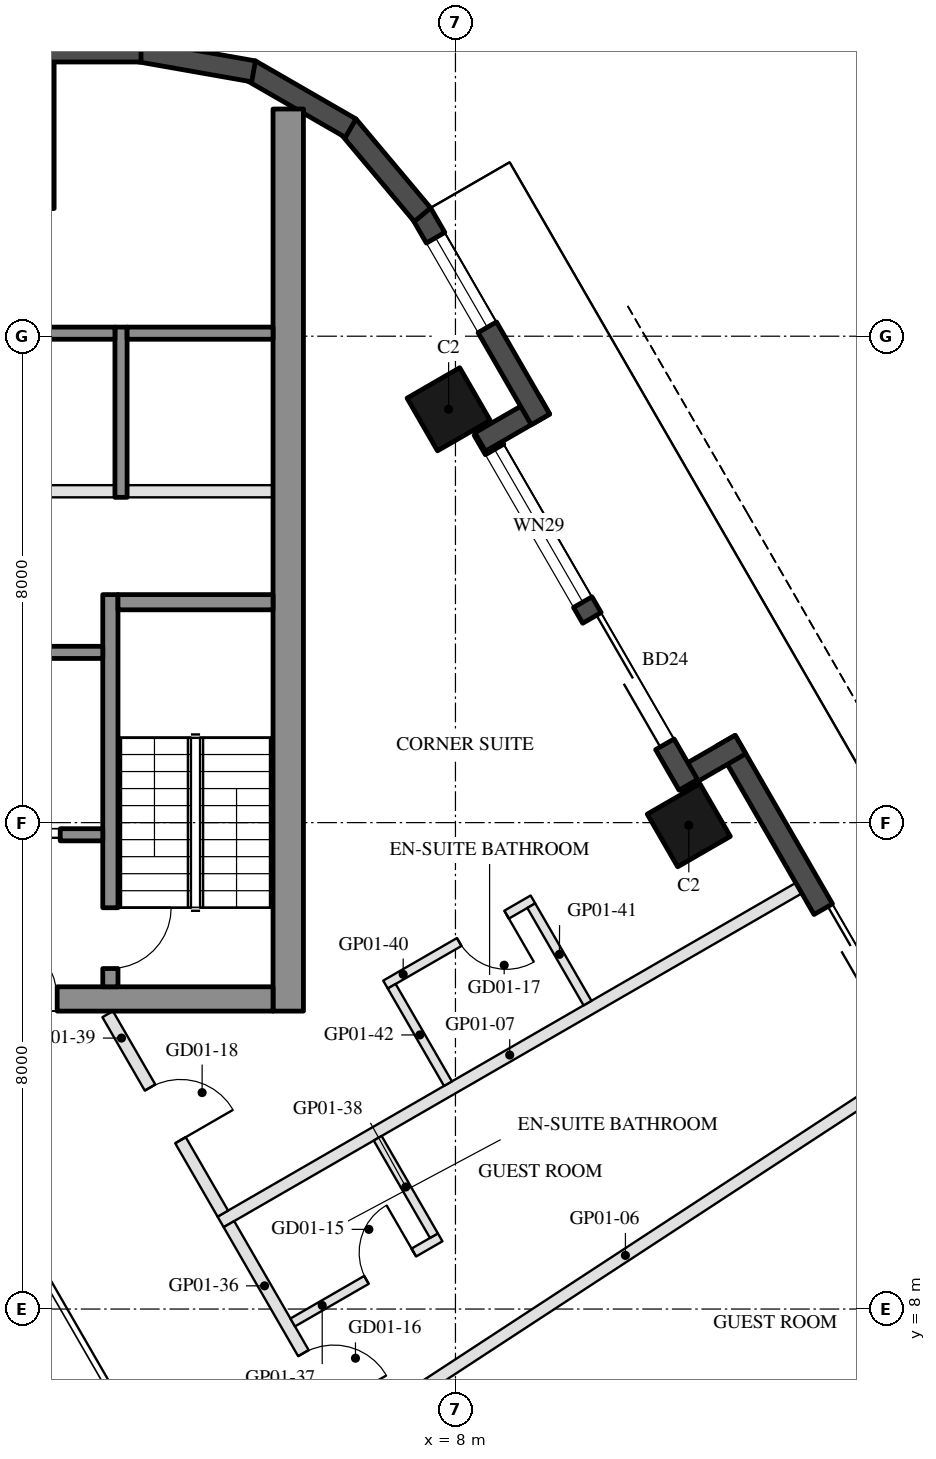
"""IFC4 building model, lengths in metres.
Left out: names, types, materials, properties, quantities, classifications, styles, units other than length and angle.
Written with IfcOpenShell. Run it as: python <this file> out.ifc"""

import sys

from ifc_helpers import new_model, si_unit, direction, frame, frame_2d, origin, origin_2d, place, context, subcontext, project, spatial, rectangle, hollow_rectangle, extrude, element, fill, save


model = new_model("IFC4")
c1 = context("Model", 3, precision=1e-05, world=origin(), true_north=direction((0.0, 1.0)))
c2 = subcontext(c1, "Body", "Model", "MODEL_VIEW")
j1 = project(units=[si_unit("LENGTHUNIT", "METRE"), si_unit("PLANEANGLEUNIT", "RADIAN")], contexts=[c1])
p1 = place(None, origin())
s1 = spatial("IfcSite", under=j1, at=p1, CompositionType="ELEMENT")
p2 = place(p1, origin())
s2 = spatial("IfcBuilding", under=s1, at=p2, CompositionType="ELEMENT")
p3 = place(p2, frame((0.0, 0.0, 50.2)))
s3 = spatial("IfcBuildingStorey", under=s2, at=p3, CompositionType="ELEMENT", Elevation=50.2)
for number, where, z_axis, x_axis in (
    (1, (11.838, 15.957, 0.0), (0.0, 0.0, 1.0), (-0.5, 0.866, 0.0)),
    (2, (7.888, 22.798, 0.0), (0.0, 0.0, 1.0), (-0.5, 0.866, 0.0)),
):
    element("IfcColumn", number, at=place(p3, frame(where, z_axis=z_axis, x_axis=x_axis)), inside=s3, PredefinedType="COLUMN", context=c2, shape_type="SweptSolid", body=[
        extrude(hollow_rectangle(XDim=1.0, YDim=1.0, WallThickness=0.045, at=origin_2d()), origin(), (0.0, 0.0, 1.0), 3.7),
    ])
p4 = place(p3, frame((0.0, 27.3, 0.0), z_axis=(0.0, 0.0, 1.0), x_axis=(1.0, 0.0, 0.0)))
e3 = element("IfcColumn", 3, at=p4, inside=s3, PredefinedType="COLUMN", context=c2, shape_type="SweptSolid", body=[
    extrude(hollow_rectangle(XDim=2.8, YDim=2.4, WallThickness=0.07, at=origin_2d()), origin(), (0.0, 0.0, 1.0), 3.7),
])
p5 = place(p3, frame((17.299, 8.948, 0.0), z_axis=(0.0, 0.0, 1.0), x_axis=(-0.500010041276, 0.866019606374, 0.0)))
e4 = element("IfcWall", 4, at=p5, inside=s3, PredefinedType="SOLIDWALL", context=c2, shape_type="SweptSolid", body=[
    extrude(rectangle(XDim=9.7, YDim=0.35, at=frame_2d((4.85, 0.0))), origin(), (0.0, 0.0, 1.0), 3.55),
])
p6 = place(p5, frame((1.8, 0.0, 0.0)))
e5 = element("IfcOpeningElement", 5, at=p6, cuts=e4, PredefinedType="OPENING", context=c2, shape_type="SweptSolid", body=[
    extrude(rectangle(XDim=1.2, YDim=2.4, at=frame_2d((0.6, 1.2))), frame((0.0, 0.185, 0.0), z_axis=(0.0, -1.0, 0.0), x_axis=(1.0, 0.0, 0.0)), (0.0, 0.0, 1.0), 0.37),
])
p7 = place(p5, frame((5.0, 0.0, 0.0)))
e6 = element("IfcOpeningElement", 6, at=p7, cuts=e4, PredefinedType="OPENING", context=c2, shape_type="SweptSolid", body=[
    extrude(rectangle(XDim=1.5, YDim=2.4, at=frame_2d((0.75, 1.2))), frame((0.0, 0.185, 0.0), z_axis=(0.0, -1.0, 0.0), x_axis=(1.0, 0.0, 0.0)), (0.0, 0.0, 1.0), 0.37),
])
p8 = place(p3, frame((12.688, 17.284, 0.0), z_axis=(0.0, 0.0, 1.0), x_axis=(-0.865955602162, -0.500120880472, 0.0)))
e7 = element("IfcWall", 7, at=p8, inside=s3, PredefinedType="SOLIDWALL", context=c2, shape_type="SweptSolid", body=[
    extrude(rectangle(XDim=1.22, YDim=0.35, at=frame_2d((0.61, 0.0))), origin(), (0.0, 0.0, 1.0), 3.55),
])
p9 = place(p3, frame((11.829, 16.621, 0.0), z_axis=(0.0, 0.0, 1.0), x_axis=(-0.500003597184, 0.866023326939, 0.0)))
e8 = element("IfcWall", 8, at=p9, inside=s3, PredefinedType="SOLIDWALL", context=c2, shape_type="SweptSolid", body=[
    extrude(rectangle(XDim=6.74, YDim=0.35, at=frame_2d((3.37, 0.0))), origin(), (0.0, 0.0, 1.0), 3.55),
])
p10 = place(p9, frame((0.77, 0.0, 0.0)))
e9 = element("IfcOpeningElement", 9, at=p10, cuts=e8, PredefinedType="OPENING", context=c2, shape_type="SweptSolid", body=[
    extrude(rectangle(XDim=2.4, YDim=2.4, at=frame_2d((1.2, 1.2))), frame((0.0, 0.185, 0.0), z_axis=(0.0, -1.0, 0.0), x_axis=(1.0, 0.0, 0.0)), (0.0, 0.0, 1.0), 0.37),
])
p11 = place(p9, frame((3.47, 0.0, 0.3)))
e10 = element("IfcOpeningElement", 10, at=p11, cuts=e8, PredefinedType="OPENING", context=c2, shape_type="SweptSolid", body=[
    extrude(rectangle(XDim=2.9, YDim=2.65, at=frame_2d((1.45, 1.325))), frame((0.0, 0.185, 0.0), z_axis=(0.0, -1.0, 0.0), x_axis=(1.0, 0.0, 0.0)), (0.0, 0.0, 1.0), 0.37),
])
p12 = place(p3, frame((8.406, 22.26, 0.0), z_axis=(0.0, 0.0, 1.0), x_axis=(0.865955602162, 0.500120880472, 0.0)))
e11 = element("IfcWall", 11, at=p12, inside=s3, PredefinedType="SOLIDWALL", context=c2, shape_type="SweptSolid", body=[
    extrude(rectangle(XDim=1.22, YDim=0.35, at=frame_2d((0.61, 0.0))), origin(), (0.0, 0.0, 1.0), 3.55),
])
p13 = place(p3, frame((9.398, 22.631, 0.0), z_axis=(0.0, 0.0, 1.0), x_axis=(-0.499954521343, 0.866051659307, 0.0)))
e12 = element("IfcWall", 12, at=p13, inside=s3, PredefinedType="SOLIDWALL", context=c2, shape_type="SweptSolid", body=[
    extrude(rectangle(XDim=3.916, YDim=0.35, at=frame_2d((1.958, 0.0))), origin(), (0.0, 0.0, 1.0), 3.55),
])
p14 = place(p13, frame((1.75, 0.0, 0.3)))
e13 = element("IfcOpeningElement", 13, at=p14, cuts=e12, PredefinedType="OPENING", context=c2, shape_type="SweptSolid", body=[
    extrude(rectangle(XDim=1.7, YDim=2.65, at=frame_2d((0.85, 1.325))), frame((0.0, 0.185, 0.0), z_axis=(0.0, -1.0, 0.0), x_axis=(1.0, 0.0, 0.0)), (0.0, 0.0, 1.0), 0.37),
])
p15 = place(p3, frame((7.458, 25.998, 0.0), z_axis=(0.0, 0.0, 1.0), x_axis=(-0.642808304945, 0.766027077259, 0.0)))
e14 = element("IfcWall", 14, at=p15, inside=s3, PredefinedType="SOLIDWALL", context=c2, shape_type="SweptSolid", body=[
    extrude(rectangle(XDim=1.91, YDim=0.35, at=frame_2d((0.955, 0.0))), origin(), (0.0, 0.0, 1.0), 3.55),
])
for number, where, z_axis, x_axis in (
    (15, (6.277, 27.422, 0.0), (0.0, 0.0, 1.0), (-0.866, 0.5, 0.0)),
    (16, (4.68, 28.356, 0.0), (0.0, 0.0, 1.0), (-0.985, 0.174, 0.0)),
):
    element("IfcWall", number, at=place(p3, frame(where, z_axis=z_axis, x_axis=x_axis)), inside=s3, PredefinedType="SOLIDWALL", context=c2, shape_type="SweptSolid", body=[
        extrude(rectangle(XDim=1.91, YDim=0.35, at=frame_2d((0.955, 0.0))), origin(), (0.0, 0.0, 1.0), 3.55),
    ])
p16 = place(p3, frame((2.829, 28.685, 0.0), z_axis=(0.0, 0.0, 1.0), x_axis=(-1.0, 0.0, 0.0)))
e17 = element("IfcWall", 17, at=p16, inside=s3, PredefinedType="SOLIDWALL", context=c2, shape_type="SweptSolid", body=[
    extrude(rectangle(XDim=5.658, YDim=0.35, at=frame_2d((2.829, 0.0))), origin(), (0.0, 0.0, 1.0), 3.55),
])
p17 = place(p3, frame((5.25, 12.9, 0.0), z_axis=(0.0, 0.0, 1.0), x_axis=(0.0, 1.0, 0.0)))
e18 = element("IfcWall", 18, at=p17, inside=s3, PredefinedType="SHEAR", context=c2, shape_type="SweptSolid", body=[
    extrude(rectangle(XDim=14.837, YDim=0.5, at=frame_2d((7.418, 0.0))), origin(), (0.0, 0.0, 1.0), 3.5),
])
p18 = place(p3, frame((5.0, 13.1, 0.0), z_axis=(0.0, 0.0, 1.0), x_axis=(-1.0, 0.0, 0.0)))
e19 = element("IfcWall", 19, at=p18, inside=s3, PredefinedType="SHEAR", context=c2, shape_type="SweptSolid", body=[
    extrude(rectangle(XDim=10.0, YDim=0.4, at=frame_2d((5.0, 0.0))), origin(), (0.0, 0.0, 1.0), 3.5),
])
p19 = place(p18, frame((3.55, 0.0, 0.0)))
e20 = element("IfcOpeningElement", 20, at=p19, cuts=e19, PredefinedType="OPENING", context=c2, shape_type="SweptSolid", body=[
    extrude(rectangle(XDim=1.1, YDim=2.1, at=frame_2d((0.55, 1.05))), frame((0.0, 0.21, 0.0), z_axis=(0.0, -1.0, 0.0), x_axis=(1.0, 0.0, 0.0)), (0.0, 0.0, 1.0), 0.42),
])
p20 = place(p18, frame((5.85, 0.0, 0.0)))
e21 = element("IfcOpeningElement", 21, at=p20, cuts=e19, PredefinedType="OPENING", context=c2, shape_type="SweptSolid", body=[
    extrude(rectangle(XDim=1.4, YDim=2.1, at=frame_2d((0.7, 1.05))), frame((0.0, 0.21, 0.0), z_axis=(0.0, -1.0, 0.0), x_axis=(1.0, 0.0, 0.0)), (0.0, 0.0, 1.0), 0.42),
])
p21 = place(p3, frame((2.325, 13.3, 0.0), z_axis=(0.0, 0.0, 1.0), x_axis=(0.0, 1.0, 0.0)))
e22 = element("IfcWall", 22, at=p21, inside=s3, PredefinedType="SHEAR", context=c2, shape_type="SweptSolid", body=[
    extrude(rectangle(XDim=6.45, YDim=0.25, at=frame_2d((3.225, 0.0))), origin(), (0.0, 0.0, 1.0), 3.5),
])
p22 = place(p21, frame((0.3, 0.0, 0.0)))
e23 = element("IfcOpeningElement", 23, at=p22, cuts=e22, PredefinedType="OPENING", context=c2, shape_type="SweptSolid", body=[
    extrude(rectangle(XDim=1.0, YDim=2.1, at=frame_2d((0.5, 1.05))), frame((0.0, 0.135, 0.0), z_axis=(0.0, -1.0, 0.0), x_axis=(1.0, 0.0, 0.0)), (0.0, 0.0, 1.0), 0.27),
])
p23 = place(p3, frame((5.0, 19.625, 0.0), z_axis=(0.0, 0.0, 1.0), x_axis=(-1.0, 0.0, 0.0)))
e24 = element("IfcWall", 24, at=p23, inside=s3, PredefinedType="SHEAR", context=c2, shape_type="SweptSolid", body=[
    extrude(rectangle(XDim=2.55, YDim=0.25, at=frame_2d((1.275, 0.0))), origin(), (0.0, 0.0, 1.0), 3.5),
])
p24 = place(p3, frame((2.2, 18.8, 0.0), z_axis=(0.0, 0.0, 1.0), x_axis=(-1.0, 0.0, 0.0)))
e25 = element("IfcWall", 25, at=p24, inside=s3, PredefinedType="SHEAR", context=c2, shape_type="SweptSolid", body=[
    extrude(rectangle(XDim=2.8, YDim=0.2, at=frame_2d((1.4, 0.0))), origin(), (0.0, 0.0, 1.0), 3.5),
])
p25 = place(p3, frame((2.2, 15.8, 0.0), z_axis=(0.0, 0.0, 1.0), x_axis=(-1.0, 0.0, 0.0)))
e26 = element("IfcWall", 26, at=p25, inside=s3, PredefinedType="SHEAR", context=c2, shape_type="SweptSolid", body=[
    extrude(rectangle(XDim=2.8, YDim=0.2, at=frame_2d((1.4, 0.0))), origin(), (0.0, 0.0, 1.0), 3.5),
])
p26 = place(p25, frame((0.7, 0.0, 0.0)))
e27 = element("IfcOpeningElement", 27, at=p26, cuts=e26, PredefinedType="OPENING", context=c2, shape_type="SweptSolid", body=[
    extrude(rectangle(XDim=1.2, YDim=2.1, at=frame_2d((0.6, 1.05))), frame((0.0, 0.11, 0.0), z_axis=(0.0, -1.0, 0.0), x_axis=(1.0, 0.0, 0.0)), (0.0, 0.0, 1.0), 0.22),
])
p27 = place(p3, frame((2.5, 21.35, 0.0), z_axis=(0.0, 0.0, 1.0), x_axis=(0.0, 1.0, 0.0)))
e28 = element("IfcWall", 28, at=p27, inside=s3, PredefinedType="SHEAR", context=c2, shape_type="SweptSolid", body=[
    extrude(rectangle(XDim=2.8, YDim=0.2, at=frame_2d((1.4, 0.0))), origin(), (0.0, 0.0, 1.0), 3.5),
])
p28 = place(p3, frame((5.0, 24.05, 0.0), z_axis=(0.0, 0.0, 1.0), x_axis=(-1.0, 0.0, 0.0)))
e29 = element("IfcWall", 29, at=p28, inside=s3, PredefinedType="SHEAR", context=c2, shape_type="SweptSolid", body=[
    extrude(rectangle(XDim=2.4, YDim=0.2, at=frame_2d((1.2, 0.0))), origin(), (0.0, 0.0, 1.0), 3.5),
])
p29 = place(p3, frame((2.4, 24.05, 0.0), z_axis=(0.0, 0.0, 1.0), x_axis=(-1.0, 0.0, 0.0)))
e30 = element("IfcWall", 30, at=p29, inside=s3, PredefinedType="SHEAR", context=c2, shape_type="SweptSolid", body=[
    extrude(rectangle(XDim=2.8, YDim=0.2, at=frame_2d((1.4, 0.0))), origin(), (0.0, 0.0, 1.0), 3.5),
])
p30 = place(p3, frame((5.0, 21.45, 0.0), z_axis=(0.0, 0.0, 1.0), x_axis=(-1.0, 0.0, 0.0)))
e31 = element("IfcWall", 31, at=p30, inside=s3, PredefinedType="PARTITIONING", context=c2, shape_type="SweptSolid", body=[
    extrude(rectangle(XDim=2.4, YDim=0.2, at=frame_2d((1.2, 0.0))), origin(), (0.0, 0.0, 1.0), 3.5),
])
p31 = place(p3, frame((2.4, 21.45, 0.0), z_axis=(0.0, 0.0, 1.0), x_axis=(-1.0, 0.0, 0.0)))
e32 = element("IfcWall", 32, at=p31, inside=s3, PredefinedType="PARTITIONING", context=c2, shape_type="SweptSolid", body=[
    extrude(rectangle(XDim=2.8, YDim=0.2, at=frame_2d((1.4, 0.0))), origin(), (0.0, 0.0, 1.0), 3.5),
])
p32 = place(p3, frame((17.055, 7.22, 0.0), z_axis=(0.0, 0.0, 1.0), x_axis=(-0.87960357017, -0.475707430407, 0.0)))
e33 = element("IfcWall", 33, at=p32, inside=s3, PredefinedType="PARTITIONING", context=c2, shape_type="SweptSolid", body=[
    extrude(rectangle(XDim=10.084, YDim=0.2, at=frame_2d((5.042, 0.0))), origin(), (0.0, 0.0, 1.0), 2.96),
])
p33 = place(p3, frame((15.397, 11.892, 0.0), z_axis=(0.0, 0.0, 1.0), x_axis=(-0.836898817878, -0.547357624076, 0.0)))
e34 = element("IfcWall", 34, at=p33, inside=s3, PredefinedType="PARTITIONING", context=c2, shape_type="SweptSolid", body=[
    extrude(rectangle(XDim=10.997, YDim=0.2, at=frame_2d((5.499, 0.0))), origin(), (0.0, 0.0, 1.0), 2.96),
])
p34 = place(p3, frame((13.647, 14.923, 0.0), z_axis=(0.0, 0.0, 1.0), x_axis=(-0.866027479907, -0.499996404033, 0.0)))
e35 = element("IfcWall", 35, at=p34, inside=s3, PredefinedType="PARTITIONING", context=c2, shape_type="SweptSolid", body=[
    extrude(rectangle(XDim=10.98, YDim=0.2, at=frame_2d((5.49, 0.0))), origin(), (0.0, 0.0, 1.0), 2.96),
])
p35 = place(p3, frame((4.275, 9.396, 0.0), z_axis=(0.0, 0.0, 1.0), x_axis=(0.499971370958, -0.866041932139, 0.0)))
e36 = element("IfcWall", 36, at=p35, inside=s3, PredefinedType="PARTITIONING", context=c2, shape_type="SweptSolid", body=[
    extrude(rectangle(XDim=3.906, YDim=0.2, at=frame_2d((1.953, 0.0))), origin(), (0.0, 0.0, 1.0), 2.95),
])
p36 = place(p35, frame((2.45, 0.0, 0.0)))
e37 = element("IfcOpeningElement", 37, at=p36, cuts=e36, PredefinedType="OPENING", context=c2, shape_type="SweptSolid", body=[
    extrude(rectangle(XDim=1.0, YDim=2.1, at=frame_2d((0.5, 1.05))), frame((0.0, 0.11, 0.0), z_axis=(0.0, -1.0, 0.0), x_axis=(1.0, 0.0, 0.0)), (0.0, 0.0, 1.0), 0.22),
])
p37 = place(p3, frame((5.324, 7.779, 0.0), z_axis=(0.0, 0.0, 1.0), x_axis=(0.865996816683, 0.500049511043, 0.0)))
e38 = element("IfcWall", 38, at=p37, inside=s3, PredefinedType="PARTITIONING", context=c2, shape_type="SweptSolid", body=[
    extrude(rectangle(XDim=2.8, YDim=0.15, at=frame_2d((1.4, 0.0))), origin(), (0.0, 0.0, 1.0), 2.95),
])
p38 = place(p37, frame((1.4, 0.0, 0.0)))
e39 = element("IfcOpeningElement", 39, at=p38, cuts=e38, PredefinedType="OPENING", context=c2, shape_type="SweptSolid", body=[
    extrude(rectangle(XDim=0.9, YDim=2.1, at=frame_2d((0.45, 1.05))), frame((0.0, 0.085, 0.0), z_axis=(0.0, -1.0, 0.0), x_axis=(1.0, 0.0, 0.0)), (0.0, 0.0, 1.0), 0.17),
])
p39 = place(p3, frame((7.646, 9.207, 0.0), z_axis=(0.0, 0.0, 1.0), x_axis=(-0.49994333299, 0.866058118026, 0.0)))
e40 = element("IfcWall", 40, at=p39, inside=s3, PredefinedType="PARTITIONING", context=c2, shape_type="SweptSolid", body=[
    extrude(rectangle(XDim=1.85, YDim=0.15, at=frame_2d((0.925, 0.0))), origin(), (0.0, 0.0, 1.0), 3.55),
])
p40 = place(p3, frame((2.281, 12.85, 0.0), z_axis=(0.0, 0.0, 1.0), x_axis=(0.499979074716, -0.866037484666, 0.0)))
e41 = element("IfcWall", 41, at=p40, inside=s3, PredefinedType="PARTITIONING", context=c2, shape_type="SweptSolid", body=[
    extrude(rectangle(XDim=3.788, YDim=0.2, at=frame_2d((1.894, 0.0))), origin(), (0.0, 0.0, 1.0), 2.95),
])
p41 = place(p40, frame((1.394, 0.0, 0.0)))
e42 = element("IfcOpeningElement", 42, at=p41, cuts=e41, PredefinedType="OPENING", context=c2, shape_type="SweptSolid", body=[
    extrude(rectangle(XDim=1.0, YDim=2.1, at=frame_2d((0.5, 1.05))), frame((0.0, 0.11, 0.0), z_axis=(0.0, -1.0, 0.0), x_axis=(1.0, 0.0, 0.0)), (0.0, 0.0, 1.0), 0.22),
])
p42 = place(p3, frame((9.274, 14.737, 0.0), z_axis=(0.0, 0.0, 1.0), x_axis=(-0.866018616679, -0.500011755427, 0.0)))
e43 = element("IfcWall", 43, at=p42, inside=s3, PredefinedType="PARTITIONING", context=c2, shape_type="SweptSolid", body=[
    extrude(rectangle(XDim=2.8, YDim=0.15, at=frame_2d((1.4, 0.0))), origin(), (0.0, 0.0, 1.0), 3.55),
])
p43 = place(p42, frame((0.5, 0.0, 0.0)))
e44 = element("IfcOpeningElement", 44, at=p43, cuts=e43, PredefinedType="OPENING", context=c2, shape_type="SweptSolid", body=[
    extrude(rectangle(XDim=0.9, YDim=2.1, at=frame_2d((0.45, 1.05))), frame((0.0, 0.085, 0.0), z_axis=(0.0, -1.0, 0.0), x_axis=(1.0, 0.0, 0.0)), (0.0, 0.0, 1.0), 0.17),
])
p44 = place(p3, frame((10.172, 13.032, 0.0), z_axis=(0.0, 0.0, 1.0), x_axis=(-0.500042316284, 0.866000971088, 0.0)))
e45 = element("IfcWall", 45, at=p44, inside=s3, PredefinedType="PARTITIONING", context=c2, shape_type="SweptSolid", body=[
    extrude(rectangle(XDim=1.85, YDim=0.15, at=frame_2d((0.925, 0.0))), origin(), (0.0, 0.0, 1.0), 2.95),
])
p45 = place(p3, frame((7.877, 11.707, 0.0), z_axis=(0.0, 0.0, 1.0), x_axis=(-0.499985172903, 0.866033964044, 0.0)))
e46 = element("IfcWall", 46, at=p45, inside=s3, PredefinedType="PARTITIONING", context=c2, shape_type="SweptSolid", body=[
    extrude(rectangle(XDim=1.85, YDim=0.15, at=frame_2d((0.925, 0.0))), origin(), (0.0, 0.0, 1.0), 2.95),
])
p46 = place(p7, frame((1.5, 0.0, 0.0), z_axis=(0.0, 0.0, 1.0), x_axis=(-1.0, 0.0, 0.0)))
e47 = element("IfcDoor", 47, at=p46, inside=s3, OperationType="SLIDING_TO_LEFT", PredefinedType="DOOR", context=c2, shape_type="SweptSolid", body=[
    extrude(rectangle(XDim=1.5, YDim=2.4, at=frame_2d((0.75, 1.2))), frame((0.0, 0.025, 0.0), z_axis=(0.0, -1.0, 0.0), x_axis=(1.0, 0.0, 0.0)), (0.0, 0.0, 1.0), 0.05),
])
fill(e6, e47)
p47 = place(p10, frame((2.4, 0.0, 0.0), z_axis=(0.0, 0.0, 1.0), x_axis=(-1.0, 0.0, 0.0)))
e48 = element("IfcDoor", 48, at=p47, inside=s3, OperationType="SLIDING_TO_LEFT", PredefinedType="DOOR", context=c2, shape_type="SweptSolid", body=[
    extrude(rectangle(XDim=2.4, YDim=2.4, at=frame_2d((1.2, 1.2))), frame((0.0, 0.025, 0.0), z_axis=(0.0, -1.0, 0.0), x_axis=(1.0, 0.0, 0.0)), (0.0, 0.0, 1.0), 0.05),
])
fill(e9, e48)
p48 = place(p11, origin())
e49 = element("IfcWindow", 49, at=p48, inside=s3, PartitioningType="SINGLE_PANEL", PredefinedType="WINDOW", context=c2, shape_type="SweptSolid", body=[
    extrude(rectangle(XDim=2.9, YDim=2.65, at=frame_2d((1.45, 1.325))), frame((0.0, 0.03, 0.0), z_axis=(0.0, -1.0, 0.0), x_axis=(1.0, 0.0, 0.0)), (0.0, 0.0, 1.0), 0.06),
])
fill(e10, e49)
p49 = place(p14, origin())
e50 = element("IfcWindow", 50, at=p49, inside=s3, PartitioningType="SINGLE_PANEL", PredefinedType="WINDOW", context=c2, shape_type="SweptSolid", body=[
    extrude(rectangle(XDim=1.7, YDim=2.65, at=frame_2d((0.85, 1.325))), frame((0.0, 0.03, 0.0), z_axis=(0.0, -1.0, 0.0), x_axis=(1.0, 0.0, 0.0)), (0.0, 0.0, 1.0), 0.06),
])
fill(e13, e50)
p50 = place(p26, origin())
e51 = element("IfcDoor", 51, at=p50, inside=s3, OperationType="DOUBLE_DOOR_SLIDING", PredefinedType="DOOR", context=c2, shape_type="SweptSolid", body=[
    extrude(rectangle(XDim=1.2, YDim=2.1, at=frame_2d((0.6, 1.05))), frame((0.0, 0.025, 0.0), z_axis=(0.0, -1.0, 0.0), x_axis=(1.0, 0.0, 0.0)), (0.0, 0.0, 1.0), 0.05),
])
fill(e27, e51)
p51 = place(p19, frame((1.1, 0.0, 0.0), z_axis=(0.0, 0.0, 1.0), x_axis=(-1.0, 0.0, 0.0)))
e52 = element("IfcDoor", 52, at=p51, inside=s3, OperationType="SINGLE_SWING_LEFT", PredefinedType="DOOR", context=c2, shape_type="SweptSolid", body=[
    extrude(rectangle(XDim=1.1, YDim=2.1, at=frame_2d((0.55, 1.05))), frame((0.0, 0.025, 0.0), z_axis=(0.0, -1.0, 0.0), x_axis=(1.0, 0.0, 0.0)), (0.0, 0.0, 1.0), 0.05),
])
fill(e20, e52)
p52 = place(p22, frame((1.0, 0.0, 0.0), z_axis=(0.0, 0.0, 1.0), x_axis=(-1.0, 0.0, 0.0)))
e53 = element("IfcDoor", 53, at=p52, inside=s3, OperationType="SINGLE_SWING_LEFT", PredefinedType="DOOR", context=c2, shape_type="SweptSolid", body=[
    extrude(rectangle(XDim=1.0, YDim=2.1, at=frame_2d((0.5, 1.05))), frame((0.0, 0.025, 0.0), z_axis=(0.0, -1.0, 0.0), x_axis=(1.0, 0.0, 0.0)), (0.0, 0.0, 1.0), 0.05),
])
fill(e23, e53)
p53 = place(p38, origin())
e54 = element("IfcDoor", 54, at=p53, inside=s3, OperationType="SINGLE_SWING_RIGHT", PredefinedType="DOOR", context=c2, shape_type="SweptSolid", body=[
    extrude(rectangle(XDim=0.9, YDim=2.1, at=frame_2d((0.45, 1.05))), frame((0.0, 0.025, 0.0), z_axis=(0.0, -1.0, 0.0), x_axis=(1.0, 0.0, 0.0)), (0.0, 0.0, 1.0), 0.05),
])
fill(e39, e54)
p54 = place(p36, origin())
e55 = element("IfcDoor", 55, at=p54, inside=s3, OperationType="SINGLE_SWING_RIGHT", PredefinedType="DOOR", context=c2, shape_type="SweptSolid", body=[
    extrude(rectangle(XDim=1.0, YDim=2.1, at=frame_2d((0.5, 1.05))), frame((0.0, 0.025, 0.0), z_axis=(0.0, -1.0, 0.0), x_axis=(1.0, 0.0, 0.0)), (0.0, 0.0, 1.0), 0.05),
])
fill(e37, e55)
p55 = place(p43, origin())
e56 = element("IfcDoor", 56, at=p55, inside=s3, OperationType="SINGLE_SWING_LEFT", PredefinedType="DOOR", context=c2, shape_type="SweptSolid", body=[
    extrude(rectangle(XDim=0.9, YDim=2.1, at=frame_2d((0.45, 1.05))), frame((0.0, 0.025, 0.0), z_axis=(0.0, -1.0, 0.0), x_axis=(1.0, 0.0, 0.0)), (0.0, 0.0, 1.0), 0.05),
])
fill(e44, e56)
p56 = place(p41, origin())
e57 = element("IfcDoor", 57, at=p56, inside=s3, OperationType="SINGLE_SWING_RIGHT", PredefinedType="DOOR", context=c2, shape_type="SweptSolid", body=[
    extrude(rectangle(XDim=1.0, YDim=2.1, at=frame_2d((0.5, 1.05))), frame((0.0, 0.025, 0.0), z_axis=(0.0, -1.0, 0.0), x_axis=(1.0, 0.0, 0.0)), (0.0, 0.0, 1.0), 0.05),
])
fill(e42, e57)
save(model, sys.argv[1])
